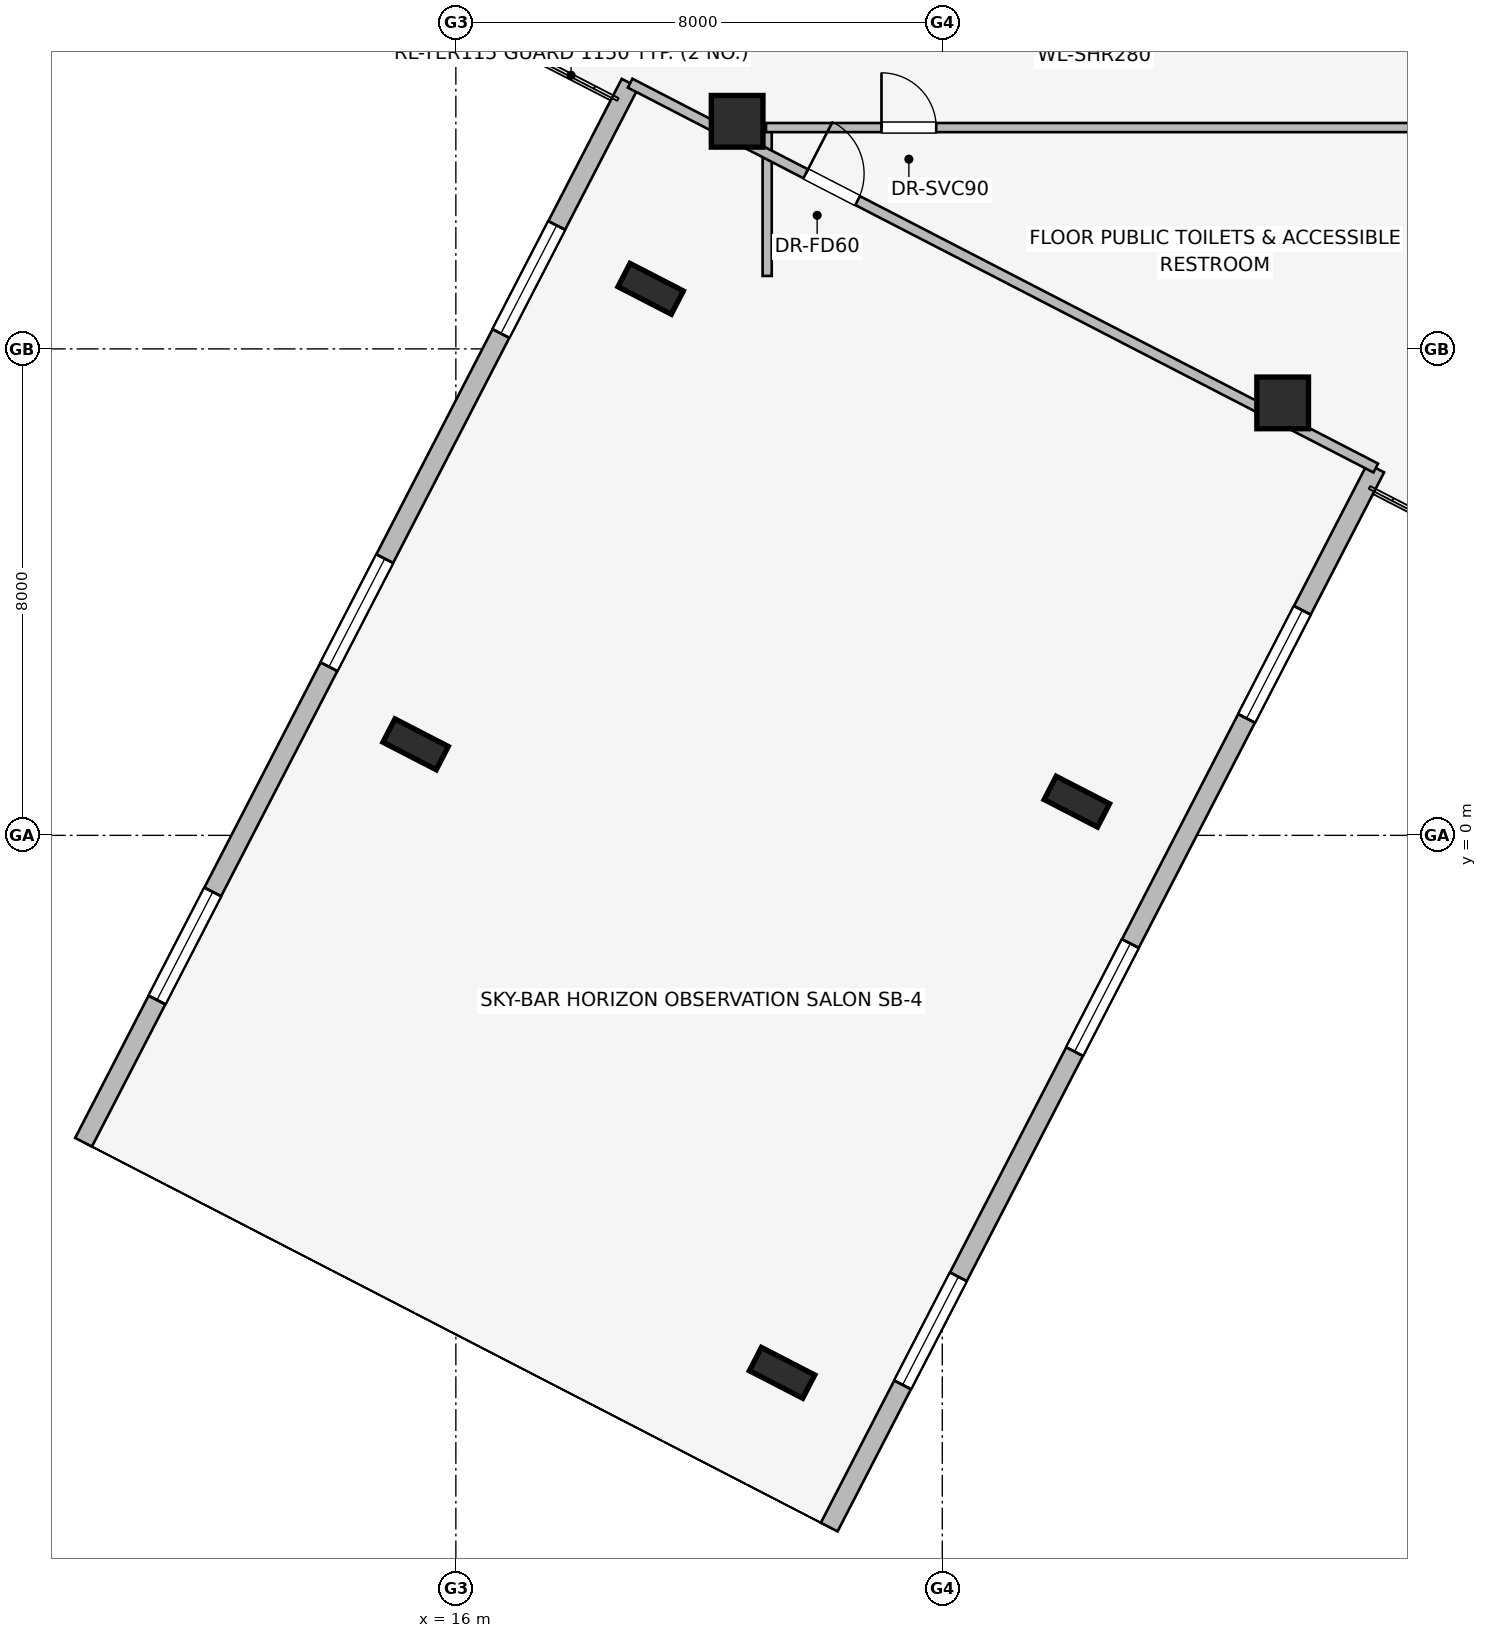
"""IFC4 building model, lengths in metres.
Left out: names, types, materials, properties, quantities, classifications, styles, units other than length and angle.
Written with IfcOpenShell. Run it as: python <this file> out.ifc"""

import sys

from ifc_helpers import new_model, si_unit, direction, frame, frame_2d, origin, origin_2d, place, context, subcontext, project, spatial, rectangle, i_section, extrude, element, fill, save


model = new_model("IFC4")
c1 = context("Model", 3, precision=1e-05, world=origin(), true_north=direction((0.0, 1.0)))
c2 = subcontext(c1, "Body", "Model", "MODEL_VIEW")
j1 = project(units=[si_unit("LENGTHUNIT", "METRE"), si_unit("PLANEANGLEUNIT", "RADIAN")], contexts=[c1])
p1 = place(None, origin())
s1 = spatial("IfcSite", under=j1, at=p1, CompositionType="ELEMENT")
p2 = place(p1, origin())
s2 = spatial("IfcBuilding", under=s1, at=p2, CompositionType="ELEMENT")
p3 = place(p2, frame((0.0, 0.0, 174.0)))
s3 = spatial("IfcBuildingStorey", under=s2, at=p3, CompositionType="ELEMENT", Elevation=174.0)
for number, where, z_axis, x_axis in (
    (1, (20.626, 11.743, 0.0), (0.0, 0.0, 1.0), (1.0, 0.0, 0.0)),
    (2, (29.598, 7.112, 0.0), (0.0, 0.0, 1.0), (1.0, 0.0, 0.0)),
):
    element("IfcColumn", number, at=place(p3, frame(where, z_axis=z_axis, x_axis=x_axis)), inside=s3, PredefinedType="COLUMN", context=c2, shape_type="SweptSolid", body=[
        extrude(rectangle(XDim=0.85, YDim=0.85, at=origin_2d()), origin(), (0.0, 0.0, 1.0), 3.45),
    ])
for number, where, z_axis, x_axis in (
    (3, (19.204, 8.988, -0.29), (0.0, 0.0, 1.0), (-0.459, -0.889, 0.0)),
    (4, (26.213, 0.554, -0.29), (0.0, 0.0, 1.0), (-0.459, -0.889, 0.0)),
    (5, (15.338, 1.497, -0.29), (0.0, 0.0, 1.0), (-0.459, -0.889, 0.0)),
    (6, (21.365, -8.839, -0.29), (0.0, 0.0, 1.0), (-0.459, -0.889, 0.0)),
):
    element("IfcColumn", number, at=place(p3, frame(where, z_axis=z_axis, x_axis=x_axis)), inside=s3, PredefinedType="COLUMN", context=c2, shape_type="SweptSolid", body=[
        extrude(i_section(OverallWidth=0.431, OverallDepth=0.987, WebThickness=0.034, FlangeThickness=0.062, at=origin_2d()), origin(), (0.0, 0.0, 1.0), 3.74),
    ])
p4 = place(p3, frame((17.489, 12.8, 0.0), z_axis=(0.0, 0.0, 1.0), x_axis=(-0.791409877269, 0.611285862884, 0.0)))
e7 = element("IfcWall", 7, at=p4, inside=s3, PredefinedType="STANDARD", context=c2, shape_type="SweptSolid", body=[
    extrude(rectangle(XDim=1.677, YDim=0.33, at=frame_2d((0.838, 0.0))), origin(), (0.0, 0.0, 1.0), 3.16),
])
p5 = place(p3, frame((9.877, -5.047, 0.0), z_axis=(0.0, 0.0, 1.0), x_axis=(0.458621661341, 0.888631628825, 0.0)))
e8 = element("IfcWall", 8, at=p5, inside=s3, PredefinedType="STANDARD", context=c2, shape_type="SweptSolid", body=[
    extrude(rectangle(XDim=19.6, YDim=0.31, at=frame_2d((9.8, 0.0))), origin(), (0.0, 0.0, 1.0), 3.16),
])
p6 = place(p5, frame((2.633, 0.0, 0.75)))
e9 = element("IfcOpeningElement", 9, at=p6, cuts=e8, PredefinedType="OPENING", context=c2, shape_type="SweptSolid", body=[
    extrude(rectangle(XDim=2.0, YDim=1.5, at=frame_2d((1.0, 0.75))), frame((0.0, 0.165, 0.0), z_axis=(0.0, -1.0, 0.0), x_axis=(1.0, 0.0, 0.0)), (0.0, 0.0, 1.0), 0.33),
])
p7 = place(p5, frame((8.8, 0.0, 0.75)))
e10 = element("IfcOpeningElement", 10, at=p7, cuts=e8, PredefinedType="OPENING", context=c2, shape_type="SweptSolid", body=[
    extrude(rectangle(XDim=2.0, YDim=1.5, at=frame_2d((1.0, 0.75))), frame((0.0, 0.165, 0.0), z_axis=(0.0, -1.0, 0.0), x_axis=(1.0, 0.0, 0.0)), (0.0, 0.0, 1.0), 0.33),
])
p8 = place(p5, frame((14.967, 0.0, 0.75)))
e11 = element("IfcOpeningElement", 11, at=p8, cuts=e8, PredefinedType="OPENING", context=c2, shape_type="SweptSolid", body=[
    extrude(rectangle(XDim=2.0, YDim=1.5, at=frame_2d((1.0, 0.75))), frame((0.0, 0.165, 0.0), z_axis=(0.0, -1.0, 0.0), x_axis=(1.0, 0.0, 0.0)), (0.0, 0.0, 1.0), 0.33),
])
p9 = place(p3, frame((31.129, 6.041, 0.0), z_axis=(0.0, 0.0, 1.0), x_axis=(-0.458626737826, -0.88862900884, 0.0)))
e12 = element("IfcWall", 12, at=p9, inside=s3, PredefinedType="STANDARD", context=c2, shape_type="SweptSolid", body=[
    extrude(rectangle(XDim=19.6, YDim=0.31, at=frame_2d((9.8, 0.0))), origin(), (0.0, 0.0, 1.0), 3.16),
])
p10 = place(p9, frame((2.633, 0.0, 0.75)))
e13 = element("IfcOpeningElement", 13, at=p10, cuts=e12, PredefinedType="OPENING", context=c2, shape_type="SweptSolid", body=[
    extrude(rectangle(XDim=2.0, YDim=1.5, at=frame_2d((1.0, 0.75))), frame((0.0, 0.165, 0.0), z_axis=(0.0, -1.0, 0.0), x_axis=(1.0, 0.0, 0.0)), (0.0, 0.0, 1.0), 0.33),
])
p11 = place(p9, frame((8.8, 0.0, 0.75)))
e14 = element("IfcOpeningElement", 14, at=p11, cuts=e12, PredefinedType="OPENING", context=c2, shape_type="SweptSolid", body=[
    extrude(rectangle(XDim=2.0, YDim=1.5, at=frame_2d((1.0, 0.75))), frame((0.0, 0.165, 0.0), z_axis=(0.0, -1.0, 0.0), x_axis=(1.0, 0.0, 0.0)), (0.0, 0.0, 1.0), 0.33),
])
p12 = place(p9, frame((14.967, 0.0, 0.75)))
e15 = element("IfcOpeningElement", 15, at=p12, cuts=e12, PredefinedType="OPENING", context=c2, shape_type="SweptSolid", body=[
    extrude(rectangle(XDim=2.0, YDim=1.5, at=frame_2d((1.0, 0.75))), frame((0.0, 0.165, 0.0), z_axis=(0.0, -1.0, 0.0), x_axis=(1.0, 0.0, 0.0)), (0.0, 0.0, 1.0), 0.33),
])
p13 = place(p3, frame((21.12, 9.2, 0.0), z_axis=(0.0, 0.0, 1.0), x_axis=(0.0, 1.0, 0.0)))
e16 = element("IfcWall", 16, at=p13, inside=s3, PredefinedType="PARTITIONING", context=c2, shape_type="SweptSolid", body=[
    extrude(rectangle(XDim=2.48, YDim=0.15, at=frame_2d((1.24, 0.0))), origin(), (0.0, 0.0, 1.0), 3.16),
])
p14 = place(p3, frame((21.1, 11.64, 0.0), z_axis=(0.0, 0.0, 1.0), x_axis=(1.0, 0.0, 0.0)))
e17 = element("IfcWall", 17, at=p14, inside=s3, PredefinedType="PARTITIONING", context=c2, shape_type="SweptSolid", body=[
    extrude(rectangle(XDim=11.75, YDim=0.15, at=frame_2d((5.875, 0.0))), origin(), (0.0, 0.0, 1.0), 3.16),
])
p15 = place(p14, frame((1.9, 0.0, 0.0)))
e18 = element("IfcOpeningElement", 18, at=p15, cuts=e17, PredefinedType="OPENING", context=c2, shape_type="SweptSolid", body=[
    extrude(rectangle(XDim=0.9, YDim=2.0, at=frame_2d((0.45, 1.0))), frame((0.0, 0.085, 0.0), z_axis=(0.0, -1.0, 0.0), x_axis=(1.0, 0.0, 0.0)), (0.0, 0.0, 1.0), 0.17),
])
p16 = place(p3, frame((18.866, 12.37, 0.0), z_axis=(0.0, 0.0, 1.0), x_axis=(0.888625308836, -0.458633906832, 0.0)))
e19 = element("IfcWall", 19, at=p16, inside=s3, PredefinedType="PARTITIONING", context=c2, shape_type="SweptSolid", body=[
    extrude(rectangle(XDim=13.8, YDim=0.165, at=frame_2d((6.9, 0.0))), origin(), (0.0, 0.0, 1.0), 2.611),
])
p17 = place(p16, frame((3.25, 0.0, 0.0)))
e20 = element("IfcOpeningElement", 20, at=p17, cuts=e19, PredefinedType="OPENING", context=c2, shape_type="SweptSolid", body=[
    extrude(rectangle(XDim=0.96, YDim=2.0, at=frame_2d((0.48, 1.0))), frame((0.0, 0.093, 0.0), z_axis=(0.0, -1.0, 0.0), x_axis=(1.0, 0.0, 0.0)), (0.0, 0.0, 1.0), 0.185),
])
p18 = place(p6, origin())
e21 = element("IfcWindow", 21, at=p18, inside=s3, PartitioningType="SINGLE_PANEL", PredefinedType="WINDOW", context=c2, shape_type="SweptSolid", body=[
    extrude(rectangle(XDim=2.0, YDim=1.5, at=frame_2d((1.0, 0.75))), frame((0.0, 0.03, 0.0), z_axis=(0.0, -1.0, 0.0), x_axis=(1.0, 0.0, 0.0)), (0.0, 0.0, 1.0), 0.06),
])
fill(e9, e21)
p19 = place(p7, origin())
e22 = element("IfcWindow", 22, at=p19, inside=s3, PartitioningType="SINGLE_PANEL", PredefinedType="WINDOW", context=c2, shape_type="SweptSolid", body=[
    extrude(rectangle(XDim=2.0, YDim=1.5, at=frame_2d((1.0, 0.75))), frame((0.0, 0.03, 0.0), z_axis=(0.0, -1.0, 0.0), x_axis=(1.0, 0.0, 0.0)), (0.0, 0.0, 1.0), 0.06),
])
fill(e10, e22)
p20 = place(p8, origin())
e23 = element("IfcWindow", 23, at=p20, inside=s3, PartitioningType="SINGLE_PANEL", PredefinedType="WINDOW", context=c2, shape_type="SweptSolid", body=[
    extrude(rectangle(XDim=2.0, YDim=1.5, at=frame_2d((1.0, 0.75))), frame((0.0, 0.03, 0.0), z_axis=(0.0, -1.0, 0.0), x_axis=(1.0, 0.0, 0.0)), (0.0, 0.0, 1.0), 0.06),
])
fill(e11, e23)
p21 = place(p10, origin())
e24 = element("IfcWindow", 24, at=p21, inside=s3, PartitioningType="SINGLE_PANEL", PredefinedType="WINDOW", context=c2, shape_type="SweptSolid", body=[
    extrude(rectangle(XDim=2.0, YDim=1.5, at=frame_2d((1.0, 0.75))), frame((0.0, 0.03, 0.0), z_axis=(0.0, -1.0, 0.0), x_axis=(1.0, 0.0, 0.0)), (0.0, 0.0, 1.0), 0.06),
])
fill(e13, e24)
p22 = place(p11, origin())
e25 = element("IfcWindow", 25, at=p22, inside=s3, PartitioningType="SINGLE_PANEL", PredefinedType="WINDOW", context=c2, shape_type="SweptSolid", body=[
    extrude(rectangle(XDim=2.0, YDim=1.5, at=frame_2d((1.0, 0.75))), frame((0.0, 0.03, 0.0), z_axis=(0.0, -1.0, 0.0), x_axis=(1.0, 0.0, 0.0)), (0.0, 0.0, 1.0), 0.06),
])
fill(e14, e25)
p23 = place(p12, origin())
e26 = element("IfcWindow", 26, at=p23, inside=s3, PartitioningType="SINGLE_PANEL", PredefinedType="WINDOW", context=c2, shape_type="SweptSolid", body=[
    extrude(rectangle(XDim=2.0, YDim=1.5, at=frame_2d((1.0, 0.75))), frame((0.0, 0.03, 0.0), z_axis=(0.0, -1.0, 0.0), x_axis=(1.0, 0.0, 0.0)), (0.0, 0.0, 1.0), 0.06),
])
fill(e15, e26)
p24 = place(p15, origin())
e27 = element("IfcDoor", 27, at=p24, inside=s3, OperationType="SINGLE_SWING_LEFT", PredefinedType="DOOR", context=c2, shape_type="SweptSolid", body=[
    extrude(rectangle(XDim=0.9, YDim=2.0, at=frame_2d((0.45, 1.0))), frame((0.0, 0.025, 0.0), z_axis=(0.0, -1.0, 0.0), x_axis=(1.0, 0.0, 0.0)), (0.0, 0.0, 1.0), 0.05),
])
fill(e18, e27)
p25 = place(p17, origin())
e28 = element("IfcDoor", 28, at=p25, inside=s3, OperationType="SINGLE_SWING_LEFT", PredefinedType="DOOR", context=c2, shape_type="SweptSolid", body=[
    extrude(rectangle(XDim=0.96, YDim=2.0, at=frame_2d((0.48, 1.0))), frame((0.0, 0.025, 0.0), z_axis=(0.0, -1.0, 0.0), x_axis=(1.0, 0.0, 0.0)), (0.0, 0.0, 1.0), 0.05),
])
fill(e20, e28)
save(model, sys.argv[1])
